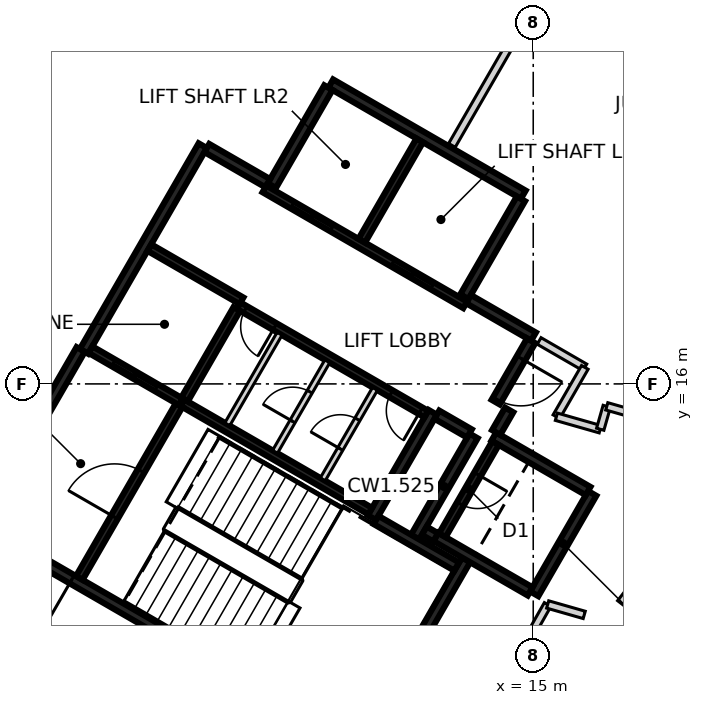
"""IFC4 building model, lengths in metres.
Left out: names, types, materials, properties, quantities, classifications, styles, units other than length and angle.
Written with IfcOpenShell. Run it as: python <this file> out.ifc"""

import sys

from ifc_helpers import new_model, si_unit, direction, frame, frame_2d, origin, place, context, subcontext, project, spatial, rectangle, extrude, element, fill, save


model = new_model("IFC4")
c1 = context("Model", 3, precision=1e-05, world=origin(), true_north=direction((0.0, 1.0)))
c2 = subcontext(c1, "Body", "Model", "MODEL_VIEW")
j1 = project(units=[si_unit("LENGTHUNIT", "METRE"), si_unit("PLANEANGLEUNIT", "RADIAN")], contexts=[c1])
p1 = place(None, origin())
s1 = spatial("IfcSite", under=j1, at=p1, CompositionType="ELEMENT")
p2 = place(p1, origin())
s2 = spatial("IfcBuilding", under=s1, at=p2, CompositionType="ELEMENT")
p3 = place(p2, frame((0.0, 0.0, 49.4)))
s3 = spatial("IfcBuildingStorey", under=s2, at=p3, CompositionType="ELEMENT", Elevation=49.4)
p4 = place(p3, frame((10.42, 6.498, 0.0), z_axis=(0.0, 0.0, 1.0), x_axis=(-0.866021906294, 0.500006057782, 0.0)))
e1 = element("IfcWall", 1, at=p4, inside=s3, PredefinedType="SHEAR", context=c2, shape_type="SweptSolid", body=[
    extrude(rectangle(XDim=11.55, YDim=0.25, at=frame_2d((5.775, 0.0))), origin(), (0.0, 0.0, 1.0), 3.125),
])
p5 = place(p4, frame((10.025, 0.0, 0.0)))
e2 = element("IfcOpeningElement", 2, at=p5, cuts=e1, PredefinedType="OPENING", context=c2, shape_type="SweptSolid", body=[
    extrude(rectangle(XDim=1.2, YDim=2.1, at=frame_2d((0.6, 1.05))), frame((0.0, 0.135, 0.0), z_axis=(0.0, -1.0, 0.0), x_axis=(1.0, 0.0, 0.0)), (0.0, 0.0, 1.0), 0.27),
])
p6 = place(p4, frame((8.725, 0.0, 0.0)))
e3 = element("IfcOpeningElement", 3, at=p6, cuts=e1, PredefinedType="OPENING", context=c2, shape_type="SweptSolid", body=[
    extrude(rectangle(XDim=1.2, YDim=2.1, at=frame_2d((0.6, 1.05))), frame((0.0, 0.135, 0.0), z_axis=(0.0, -1.0, 0.0), x_axis=(1.0, 0.0, 0.0)), (0.0, 0.0, 1.0), 0.27),
])
p7 = place(p3, frame((3.179, 16.856, 0.0), z_axis=(0.0, 0.0, 1.0), x_axis=(0.500004234368, 0.866022959057, 0.0)))
e4 = element("IfcWall", 4, at=p7, inside=s3, PredefinedType="SHEAR", context=c2, shape_type="SweptSolid", body=[
    extrude(rectangle(XDim=6.25, YDim=0.25, at=frame_2d((3.125, 0.0))), origin(), (0.0, 0.0, 1.0), 3.125),
])
p8 = place(p3, frame((9.673, 23.903, 0.0), z_axis=(0.0, 0.0, 1.0), x_axis=(0.86603616409, -0.499981362141, 0.0)))
e5 = element("IfcWall", 5, at=p8, inside=s3, PredefinedType="SHEAR", context=c2, shape_type="SweptSolid", body=[
    extrude(rectangle(XDim=5.85, YDim=0.25, at=frame_2d((2.925, 0.0))), origin(), (0.0, 0.0, 1.0), 3.125),
])
p9 = place(p3, frame((0.48, 12.381, 0.0), z_axis=(0.0, 0.0, 1.0), x_axis=(0.49999885962, 0.866026062182, 0.0)))
e6 = element("IfcWall", 6, at=p9, inside=s3, PredefinedType="SHEAR", context=c2, shape_type="SweptSolid", body=[
    extrude(rectangle(XDim=5.225, YDim=0.25, at=frame_2d((2.612, 0.0))), origin(), (0.0, 0.0, 1.0), 3.125),
])
p10 = place(p3, frame((13.238, 11.378, 0.0), z_axis=(0.0, 0.0, 1.0), x_axis=(-0.500008851346, -0.866020293397, 0.0)))
e7 = element("IfcWall", 7, at=p10, inside=s3, PredefinedType="SHEAR", context=c2, shape_type="SweptSolid", body=[
    extrude(rectangle(XDim=5.51, YDim=0.25, at=frame_2d((2.755, 0.0))), origin(), (0.0, 0.0, 1.0), 3.125),
])
p11 = place(p3, frame((12.357, 15.252, 0.0), z_axis=(0.0, 0.0, 1.0), x_axis=(-0.500028443584, -0.866008981251, 0.0)))
e8 = element("IfcWall", 8, at=p11, inside=s3, PredefinedType="SHEAR", context=c2, shape_type="SweptSolid", body=[
    extrude(rectangle(XDim=3.2, YDim=0.25, at=frame_2d((1.6, 0.0))), origin(), (0.0, 0.0, 1.0), 3.125),
])
for number, where, z_axis, x_axis in (
    (9, (8.123, 21.219, 0.0), (0.0, 0.0, 1.0), (0.5, 0.866, 0.0)),
    (10, (14.676, 20.87, 0.0), (0.0, 0.0, 1.0), (-0.5, -0.866, 0.0)),
):
    element("IfcWall", number, at=place(p3, frame(where, z_axis=z_axis, x_axis=x_axis)), inside=s3, PredefinedType="SHEAR", context=c2, shape_type="SweptSolid", body=[
        extrude(rectangle(XDim=2.975, YDim=0.25, at=frame_2d((1.487, 0.0))), origin(), (0.0, 0.0, 1.0), 3.125),
    ])
p12 = place(p3, frame((16.552, 13.119, 0.0), z_axis=(0.0, 0.0, 1.0), x_axis=(-0.499978833458, -0.866037623948, 0.0)))
e11 = element("IfcWall", 11, at=p12, inside=s3, PredefinedType="SHEAR", context=c2, shape_type="SweptSolid", body=[
    extrude(rectangle(XDim=3.05, YDim=0.25, at=frame_2d((1.525, 0.0))), origin(), (0.0, 0.0, 1.0), 3.125),
])
p13 = place(p3, frame((14.918, 10.54, 0.0), z_axis=(0.0, 0.0, 1.0), x_axis=(-0.866063538972, 0.499933942099, 0.0)))
e12 = element("IfcWall", 12, at=p13, inside=s3, PredefinedType="SHEAR", context=c2, shape_type="SweptSolid", body=[
    extrude(rectangle(XDim=2.865, YDim=0.25, at=frame_2d((1.432, 0.0))), origin(), (0.0, 0.0, 1.0), 3.125),
])
p14 = place(p3, frame((13.963, 14.614, 0.0), z_axis=(0.0, 0.0, 1.0), x_axis=(0.866042235819, -0.499970844928, 0.0)))
e13 = element("IfcWall", 13, at=p14, inside=s3, PredefinedType="SHEAR", context=c2, shape_type="SweptSolid", body=[
    extrude(rectangle(XDim=2.865, YDim=0.25, at=frame_2d((1.432, 0.0))), origin(), (0.0, 0.0, 1.0), 3.125),
])
p15 = place(p3, frame((11.888, 11.961, 0.0), z_axis=(0.0, 0.0, 1.0), x_axis=(0.500003324108, 0.866023484601, 0.0)))
e14 = element("IfcWall", 14, at=p15, inside=s3, PredefinedType="SHEAR", context=c2, shape_type="SweptSolid", body=[
    extrude(rectangle(XDim=3.085, YDim=0.25, at=frame_2d((1.542, 0.0))), origin(), (0.0, 0.0, 1.0), 3.125),
])
p16 = place(p3, frame((10.865, 12.418, 0.0), z_axis=(0.0, 0.0, 1.0), x_axis=(0.866026229868, -0.499998569178, 0.0)))
e15 = element("IfcWall", 15, at=p16, inside=s3, PredefinedType="SHEAR", context=c2, shape_type="SweptSolid", body=[
    extrude(rectangle(XDim=2.449, YDim=0.25, at=frame_2d((1.225, 0.0))), origin(), (0.0, 0.0, 1.0), 3.125),
])
p17 = place(p3, frame((13.297, 18.231, 0.0), z_axis=(0.0, 0.0, 1.0), x_axis=(0.866043531843, -0.499968599967, 0.0)))
e16 = element("IfcWall", 16, at=p17, inside=s3, PredefinedType="SHEAR", context=c2, shape_type="SweptSolid", body=[
    extrude(rectangle(XDim=1.975, YDim=0.25, at=frame_2d((0.987, 0.0))), origin(), (0.0, 0.0, 1.0), 3.125),
])
p18 = place(p3, frame((6.413, 22.206, 0.0), z_axis=(0.0, 0.0, 1.0), x_axis=(0.866016279763, -0.500015802937, 0.0)))
e17 = element("IfcWall", 17, at=p18, inside=s3, PredefinedType="SHEAR", context=c2, shape_type="SweptSolid", body=[
    extrude(rectangle(XDim=1.849, YDim=0.25, at=frame_2d((0.925, 0.0))), origin(), (0.0, 0.0, 1.0), 3.125),
])
p19 = place(p3, frame((14.945, 17.135, 0.0), z_axis=(0.0, 0.0, 1.0), x_axis=(-0.499983108224, -0.866035156036, 0.0)))
e18 = element("IfcWall", 18, at=p19, inside=s3, PredefinedType="SHEAR", context=c2, shape_type="SweptSolid", body=[
    extrude(rectangle(XDim=1.865, YDim=0.25, at=frame_2d((0.932, 0.0))), origin(), (0.0, 0.0, 1.0), 3.125),
])
p20 = place(p19, frame((0.535, 0.0, 0.0)))
e19 = element("IfcOpeningElement", 19, at=p20, cuts=e18, PredefinedType="OPENING", context=c2, shape_type="SweptSolid", body=[
    extrude(rectangle(XDim=1.25, YDim=2.1, at=frame_2d((0.625, 1.05))), frame((0.0, 0.135, 0.0), z_axis=(0.0, -1.0, 0.0), x_axis=(1.0, 0.0, 0.0)), (0.0, 0.0, 1.0), 0.27),
])
p21 = place(p3, frame((13.322, 14.695, 0.0), z_axis=(0.0, 0.0, 1.0), x_axis=(-0.866017078145, 0.500014420154, 0.0)))
e20 = element("IfcWall", 20, at=p21, inside=s3, PredefinedType="SHEAR", context=c2, shape_type="SweptSolid", body=[
    extrude(rectangle(XDim=0.989, YDim=0.25, at=frame_2d((0.495, 0.0))), origin(), (0.0, 0.0, 1.0), 3.125),
])
p22 = place(p3, frame((14.368, 15.315, 0.0), z_axis=(0.0, 0.0, 1.0), x_axis=(-0.499897359611, -0.866084655132, 0.0)))
e21 = element("IfcWall", 21, at=p22, inside=s3, PredefinedType="SHEAR", context=c2, shape_type="SweptSolid", body=[
    extrude(rectangle(XDim=0.685, YDim=0.25, at=frame_2d((0.342, 0.0))), origin(), (0.0, 0.0, 1.0), 3.125),
])
p23 = place(p3, frame((12.433, 11.964, 0.0), z_axis=(0.0, 0.0, 1.0), x_axis=(-0.866055875208, 0.499947218231, 0.0)))
e22 = element("IfcWall", 22, at=p23, inside=s3, PredefinedType="SHEAR", context=c2, shape_type="SweptSolid", body=[
    extrude(rectangle(XDim=0.345, YDim=0.25, at=frame_2d((0.172, 0.0))), origin(), (0.0, 0.0, 1.0), 3.125),
])
p24 = place(p3, frame((13.21, 18.08, 0.0), z_axis=(0.0, 0.0, 1.0), x_axis=(-0.866030299012, 0.499991521122, 0.0)))
e23 = element("IfcWall", 23, at=p24, inside=s3, PredefinedType="SHEAR", context=c2, shape_type="SweptSolid", body=[
    extrude(rectangle(XDim=6.1, YDim=0.2, at=frame_2d((3.05, 0.0))), origin(), (0.0, 0.0, 1.0), 3.125),
])
p25 = place(p24, frame((1.0, 0.0, 0.0)))
e24 = element("IfcOpeningElement", 24, at=p25, cuts=e23, PredefinedType="OPENING", context=c2, shape_type="SweptSolid", body=[
    extrude(rectangle(XDim=1.2, YDim=2.1, at=frame_2d((0.6, 1.05))), frame((0.0, 0.11, 0.0), z_axis=(0.0, -1.0, 0.0), x_axis=(1.0, 0.0, 0.0)), (0.0, 0.0, 1.0), 0.22),
])
p26 = place(p24, frame((4.05, 0.0, 0.0)))
e25 = element("IfcOpeningElement", 25, at=p26, cuts=e23, PredefinedType="OPENING", context=c2, shape_type="SweptSolid", body=[
    extrude(rectangle(XDim=1.2, YDim=2.1, at=frame_2d((0.6, 1.05))), frame((0.0, 0.11, 0.0), z_axis=(0.0, -1.0, 0.0), x_axis=(1.0, 0.0, 0.0)), (0.0, 0.0, 1.0), 0.22),
])
p27 = place(p3, frame((5.775, 15.502, 0.0), z_axis=(0.0, 0.0, 1.0), x_axis=(0.866020080793, -0.500009219579, 0.0)))
e26 = element("IfcWall", 26, at=p27, inside=s3, PredefinedType="SHEAR", context=c2, shape_type="SweptSolid", body=[
    extrude(rectangle(XDim=5.699, YDim=0.2, at=frame_2d((2.85, 0.0))), origin(), (0.0, 0.0, 1.0), 3.125),
])
p28 = place(p3, frame((12.185, 15.207, 0.0), z_axis=(0.0, 0.0, 1.0), x_axis=(-0.866020080793, 0.500009219579, 0.0)))
e27 = element("IfcWall", 27, at=p28, inside=s3, PredefinedType="SHEAR", context=c2, shape_type="SweptSolid", body=[
    extrude(rectangle(XDim=5.699, YDim=0.2, at=frame_2d((2.85, 0.0))), origin(), (0.0, 0.0, 1.0), 3.125),
])
p29 = place(p28, frame((0.174, 0.0, 0.0)))
e28 = element("IfcOpeningElement", 28, at=p29, cuts=e27, PredefinedType="OPENING", context=c2, shape_type="SweptSolid", body=[
    extrude(rectangle(XDim=0.9, YDim=2.1, at=frame_2d((0.45, 1.05))), frame((0.0, 0.11, 0.0), z_axis=(0.0, -1.0, 0.0), x_axis=(1.0, 0.0, 0.0)), (0.0, 0.0, 1.0), 0.22),
])
p30 = place(p28, frame((4.599, 0.0, 0.0)))
e29 = element("IfcOpeningElement", 29, at=p30, cuts=e27, PredefinedType="OPENING", context=c2, shape_type="SweptSolid", body=[
    extrude(rectangle(XDim=0.9, YDim=2.1, at=frame_2d((0.45, 1.05))), frame((0.0, 0.11, 0.0), z_axis=(0.0, -1.0, 0.0), x_axis=(1.0, 0.0, 0.0)), (0.0, 0.0, 1.0), 0.22),
])
p31 = place(p3, frame((3.057, 10.895, 0.0), z_axis=(0.0, 0.0, 1.0), x_axis=(0.499989418164, 0.866031513124, 0.0)))
e30 = element("IfcWall", 30, at=p31, inside=s3, PredefinedType="SHEAR", context=c2, shape_type="SweptSolid", body=[
    extrude(rectangle(XDim=5.251, YDim=0.2, at=frame_2d((2.625, 0.0))), origin(), (0.0, 0.0, 1.0), 3.125),
])
p32 = place(p31, frame((1.849, 0.0, 0.0)))
e31 = element("IfcOpeningElement", 31, at=p32, cuts=e30, PredefinedType="OPENING", context=c2, shape_type="SweptSolid", body=[
    extrude(rectangle(XDim=1.4, YDim=2.1, at=frame_2d((0.7, 1.05))), frame((0.0, 0.11, 0.0), z_axis=(0.0, -1.0, 0.0), x_axis=(1.0, 0.0, 0.0)), (0.0, 0.0, 1.0), 0.22),
])
p33 = place(p3, frame((10.489, 19.767, 0.0), z_axis=(0.0, 0.0, 1.0), x_axis=(0.499946628782, 0.866056215479, 0.0)))
e32 = element("IfcWall", 32, at=p33, inside=s3, PredefinedType="SHEAR", context=c2, shape_type="SweptSolid", body=[
    extrude(rectangle(XDim=3.048, YDim=0.2, at=frame_2d((1.524, 0.0))), origin(), (0.0, 0.0, 1.0), 3.125),
])
p34 = place(p3, frame((14.008, 14.442, 0.0), z_axis=(0.0, 0.0, 1.0), x_axis=(-0.499986818241, -0.866033014143, 0.0)))
e33 = element("IfcWall", 33, at=p34, inside=s3, PredefinedType="SHEAR", context=c2, shape_type="SweptSolid", body=[
    extrude(rectangle(XDim=2.798, YDim=0.2, at=frame_2d((1.399, 0.0))), origin(), (0.0, 0.0, 1.0), 3.125),
])
p35 = place(p34, frame((0.949, 0.0, 0.0)))
e34 = element("IfcOpeningElement", 34, at=p35, cuts=e33, PredefinedType="OPENING", context=c2, shape_type="SweptSolid", body=[
    extrude(rectangle(XDim=0.9, YDim=2.1, at=frame_2d((0.45, 1.05))), frame((0.0, 0.11, 0.0), z_axis=(0.0, -1.0, 0.0), x_axis=(1.0, 0.0, 0.0)), (0.0, 0.0, 1.0), 0.22),
])
p36 = place(p3, frame((7.199, 17.97, 0.0), z_axis=(0.0, 0.0, 1.0), x_axis=(-0.499968400327, -0.866043647095, 0.0)))
e35 = element("IfcWall", 35, at=p36, inside=s3, PredefinedType="SHEAR", context=c2, shape_type="SweptSolid", body=[
    extrude(rectangle(XDim=2.75, YDim=0.2, at=frame_2d((1.375, 0.0))), origin(), (0.0, 0.0, 1.0), 3.125),
])
p37 = place(p3, frame((5.725, 15.531, 0.0), z_axis=(0.0, 0.0, 1.0), x_axis=(-0.866037306777, 0.499979382845, 0.0)))
e36 = element("IfcWall", 36, at=p37, inside=s3, PredefinedType="SHEAR", context=c2, shape_type="SweptSolid", body=[
    extrude(rectangle(XDim=2.742, YDim=0.2, at=frame_2d((1.371, 0.0))), origin(), (0.0, 0.0, 1.0), 3.125),
])
p38 = place(p37, frame((0.743, 0.0, 0.0)))
e37 = element("IfcOpeningElement", 37, at=p38, cuts=e36, PredefinedType="OPENING", context=c2, shape_type="SweptSolid", body=[
    extrude(rectangle(XDim=1.3, YDim=2.1, at=frame_2d((0.65, 1.05))), frame((0.0, 0.11, 0.0), z_axis=(0.0, -1.0, 0.0), x_axis=(1.0, 0.0, 0.0)), (0.0, 0.0, 1.0), 0.22),
])
p39 = place(p3, frame((4.901, 19.586, 0.0), z_axis=(0.0, 0.0, 1.0), x_axis=(0.866022890907, -0.500004352405, 0.0)))
e38 = element("IfcWall", 38, at=p39, inside=s3, PredefinedType="SHEAR", context=c2, shape_type="SweptSolid", body=[
    extrude(rectangle(XDim=2.799, YDim=0.2, at=frame_2d((1.399, 0.0))), origin(), (0.0, 0.0, 1.0), 3.125),
])
p40 = place(p3, frame((9.462, 13.489, 0.0), z_axis=(0.0, 0.0, 1.0), x_axis=(0.50002746344, 0.86600954718, 0.0)))
e39 = element("IfcWall", 39, at=p40, inside=s3, PredefinedType="PARTITIONING", context=c2, shape_type="SweptSolid", body=[
    extrude(rectangle(XDim=2.748, YDim=0.15, at=frame_2d((1.374, 0.0))), origin(), (0.0, 0.0, 1.0), 3.125),
])
p41 = place(p40, frame((0.924, 0.0, 0.0)))
e40 = element("IfcOpeningElement", 40, at=p41, cuts=e39, PredefinedType="OPENING", context=c2, shape_type="SweptSolid", body=[
    extrude(rectangle(XDim=0.9, YDim=2.1, at=frame_2d((0.45, 1.05))), frame((0.0, 0.085, 0.0), z_axis=(0.0, -1.0, 0.0), x_axis=(1.0, 0.0, 0.0)), (0.0, 0.0, 1.0), 0.17),
])
p42 = place(p3, frame((8.207, 14.214, 0.0), z_axis=(0.0, 0.0, 1.0), x_axis=(0.499922376475, 0.866070215109, 0.0)))
e41 = element("IfcWall", 41, at=p42, inside=s3, PredefinedType="PARTITIONING", context=c2, shape_type="SweptSolid", body=[
    extrude(rectangle(XDim=2.749, YDim=0.15, at=frame_2d((1.374, 0.0))), origin(), (0.0, 0.0, 1.0), 3.125),
])
p43 = place(p42, frame((0.924, 0.0, 0.0)))
e42 = element("IfcOpeningElement", 42, at=p43, cuts=e41, PredefinedType="OPENING", context=c2, shape_type="SweptSolid", body=[
    extrude(rectangle(XDim=0.9, YDim=2.1, at=frame_2d((0.45, 1.05))), frame((0.0, 0.085, 0.0), z_axis=(0.0, -1.0, 0.0), x_axis=(1.0, 0.0, 0.0)), (0.0, 0.0, 1.0), 0.17),
])
p44 = place(p3, frame((6.951, 14.939, 0.0), z_axis=(0.0, 0.0, 1.0), x_axis=(0.50002746344, 0.86600954718, 0.0)))
e43 = element("IfcWall", 43, at=p44, inside=s3, PredefinedType="PARTITIONING", context=c2, shape_type="SweptSolid", body=[
    extrude(rectangle(XDim=2.748, YDim=0.15, at=frame_2d((1.374, 0.0))), origin(), (0.0, 0.0, 1.0), 3.125),
])
p45 = place(p3, frame((12.432, 4.992, 0.0), z_axis=(0.0, 0.0, 1.0), x_axis=(0.492790102015, 0.870148214591, 0.0)))
e44 = element("IfcWall", 44, at=p45, inside=s3, PredefinedType="PARTITIONING", context=c2, shape_type="SweptSolid", body=[
    extrude(rectangle(XDim=5.981, YDim=0.2, at=frame_2d((2.991, 0.0))), origin(), (0.0, 0.0, 1.0), 3.125),
])
p46 = place(p3, frame((15.156, 17.13, 0.0), z_axis=(0.0, 0.0, 1.0), x_axis=(0.865755062894, -0.500467952093, 0.0)))
e45 = element("IfcWall", 45, at=p46, inside=s3, PredefinedType="PARTITIONING", context=c2, shape_type="SweptSolid", body=[
    extrude(rectangle(XDim=1.389, YDim=0.2, at=frame_2d((0.694, 0.0))), origin(), (0.0, 0.0, 1.0), 3.125),
])
p47 = place(p3, frame((15.38, 10.197, 0.0), z_axis=(0.0, 0.0, 1.0), x_axis=(0.961523947641, -0.274721127897, 0.0)))
e46 = element("IfcWall", 46, at=p47, inside=s3, PredefinedType="PARTITIONING", context=c2, shape_type="SweptSolid", body=[
    extrude(rectangle(XDim=1.001, YDim=0.2, at=frame_2d((0.5, 0.0))), origin(), (0.0, 0.0, 1.0), 3.125),
])
p48 = place(p3, frame((15.609, 15.136, 0.0), z_axis=(0.0, 0.0, 1.0), x_axis=(0.499501622561, 0.866312950993, 0.0)))
e47 = element("IfcWall", 47, at=p48, inside=s3, PredefinedType="PARTITIONING", context=c2, shape_type="SweptSolid", body=[
    extrude(rectangle(XDim=1.5, YDim=0.2, at=frame_2d((0.75, 0.0))), origin(), (0.0, 0.0, 1.0), 3.125),
])
p49 = place(p3, frame((15.609, 15.136, 0.0), z_axis=(0.0, 0.0, 1.0), x_axis=(0.961662011825, -0.274237442763, 0.0)))
e48 = element("IfcWall", 48, at=p49, inside=s3, PredefinedType="PARTITIONING", context=c2, shape_type="SweptSolid", body=[
    extrude(rectangle(XDim=1.2, YDim=0.2, at=frame_2d((0.6, 0.0))), origin(), (0.0, 0.0, 1.0), 3.125),
])
p50 = place(p3, frame((16.763, 14.807, 0.0), z_axis=(0.0, 0.0, 1.0), x_axis=(0.274464026122, 0.961597368115, 0.0)))
e49 = element("IfcWall", 49, at=p50, inside=s3, PredefinedType="PARTITIONING", context=c2, shape_type="SweptSolid", body=[
    extrude(rectangle(XDim=0.627, YDim=0.2, at=frame_2d((0.313, 0.0))), origin(), (0.0, 0.0, 1.0), 3.125),
])
p51 = place(p3, frame((16.935, 15.41, 0.0), z_axis=(0.0, 0.0, 1.0), x_axis=(0.961602664273, -0.274445470107, 0.0)))
e50 = element("IfcWall", 50, at=p51, inside=s3, PredefinedType="PARTITIONING", context=c2, shape_type="SweptSolid", body=[
    extrude(rectangle(XDim=0.936, YDim=0.2, at=frame_2d((0.468, 0.0))), origin(), (0.0, 0.0, 1.0), 3.125),
])
p52 = place(p3, frame((17.299, 10.235, 0.0), z_axis=(0.0, 0.0, 1.0), x_axis=(0.61377461522, 0.789481299153, 0.0)))
e51 = element("IfcWall", 51, at=p52, inside=s3, PredefinedType="PARTITIONING", context=c2, shape_type="SweptSolid", body=[
    extrude(rectangle(XDim=2.851, YDim=0.2, at=frame_2d((1.426, 0.0))), origin(), (0.0, 0.0, 1.0), 3.125),
])
p53 = place(p3, frame((12.861, 22.276, 0.0), z_axis=(0.0, 0.0, 1.0), x_axis=(0.499824227645, 0.86612686222, 0.0)))
e52 = element("IfcWall", 52, at=p53, inside=s3, PredefinedType="PARTITIONING", context=c2, shape_type="SweptSolid", body=[
    extrude(rectangle(XDim=7.753, YDim=0.2, at=frame_2d((3.876, 0.0))), origin(), (0.0, 0.0, 1.0), 3.125),
])
p54 = place(p38, origin())
e53 = element("IfcDoor", 53, at=p54, inside=s3, OperationType="SLIDING_TO_RIGHT", PredefinedType="DOOR", context=c2, shape_type="SweptSolid", body=[
    extrude(rectangle(XDim=1.3, YDim=2.1, at=frame_2d((0.65, 1.05))), frame((0.0, 0.025, 0.0), z_axis=(0.0, -1.0, 0.0), x_axis=(1.0, 0.0, 0.0)), (0.0, 0.0, 1.0), 0.05),
])
fill(e37, e53)
p55 = place(p25, origin())
e54 = element("IfcDoor", 54, at=p55, inside=s3, OperationType="DOUBLE_DOOR_SLIDING", PredefinedType="DOOR", context=c2, shape_type="SweptSolid", body=[
    extrude(rectangle(XDim=1.2, YDim=2.1, at=frame_2d((0.6, 1.05))), frame((0.0, 0.025, 0.0), z_axis=(0.0, -1.0, 0.0), x_axis=(1.0, 0.0, 0.0)), (0.0, 0.0, 1.0), 0.05),
])
fill(e24, e54)
p56 = place(p26, origin())
e55 = element("IfcDoor", 55, at=p56, inside=s3, OperationType="DOUBLE_DOOR_SLIDING", PredefinedType="DOOR", context=c2, shape_type="SweptSolid", body=[
    extrude(rectangle(XDim=1.2, YDim=2.1, at=frame_2d((0.6, 1.05))), frame((0.0, 0.025, 0.0), z_axis=(0.0, -1.0, 0.0), x_axis=(1.0, 0.0, 0.0)), (0.0, 0.0, 1.0), 0.05),
])
fill(e25, e55)
p57 = place(p20, origin())
e56 = element("IfcDoor", 56, at=p57, inside=s3, OperationType="SINGLE_SWING_LEFT", PredefinedType="DOOR", context=c2, shape_type="SweptSolid", body=[
    extrude(rectangle(XDim=1.25, YDim=2.1, at=frame_2d((0.625, 1.05))), frame((0.0, 0.025, 0.0), z_axis=(0.0, -1.0, 0.0), x_axis=(1.0, 0.0, 0.0)), (0.0, 0.0, 1.0), 0.05),
])
fill(e19, e56)
p58 = place(p6, origin())
e57 = element("IfcDoor", 57, at=p58, inside=s3, OperationType="SINGLE_SWING_RIGHT", PredefinedType="DOOR", context=c2, shape_type="SweptSolid", body=[
    extrude(rectangle(XDim=1.2, YDim=2.1, at=frame_2d((0.6, 1.05))), frame((0.0, 0.025, 0.0), z_axis=(0.0, -1.0, 0.0), x_axis=(1.0, 0.0, 0.0)), (0.0, 0.0, 1.0), 0.05),
])
fill(e3, e57)
p59 = place(p32, origin())
e58 = element("IfcDoor", 58, at=p59, inside=s3, OperationType="SINGLE_SWING_RIGHT", PredefinedType="DOOR", context=c2, shape_type="SweptSolid", body=[
    extrude(rectangle(XDim=1.4, YDim=2.1, at=frame_2d((0.7, 1.05))), frame((0.0, 0.025, 0.0), z_axis=(0.0, -1.0, 0.0), x_axis=(1.0, 0.0, 0.0)), (0.0, 0.0, 1.0), 0.05),
])
fill(e31, e58)
p60 = place(p29, origin())
e59 = element("IfcDoor", 59, at=p60, inside=s3, OperationType="SINGLE_SWING_LEFT", PredefinedType="DOOR", context=c2, shape_type="SweptSolid", body=[
    extrude(rectangle(XDim=0.9, YDim=2.1, at=frame_2d((0.45, 1.05))), frame((0.0, 0.025, 0.0), z_axis=(0.0, -1.0, 0.0), x_axis=(1.0, 0.0, 0.0)), (0.0, 0.0, 1.0), 0.05),
])
fill(e28, e59)
p61 = place(p41, origin())
e60 = element("IfcDoor", 60, at=p61, inside=s3, OperationType="SINGLE_SWING_RIGHT", PredefinedType="DOOR", context=c2, shape_type="SweptSolid", body=[
    extrude(rectangle(XDim=0.9, YDim=2.1, at=frame_2d((0.45, 1.05))), frame((0.0, 0.025, 0.0), z_axis=(0.0, -1.0, 0.0), x_axis=(1.0, 0.0, 0.0)), (0.0, 0.0, 1.0), 0.05),
])
fill(e40, e60)
p62 = place(p43, origin())
e61 = element("IfcDoor", 61, at=p62, inside=s3, OperationType="SINGLE_SWING_LEFT", PredefinedType="DOOR", context=c2, shape_type="SweptSolid", body=[
    extrude(rectangle(XDim=0.9, YDim=2.1, at=frame_2d((0.45, 1.05))), frame((0.0, 0.025, 0.0), z_axis=(0.0, -1.0, 0.0), x_axis=(1.0, 0.0, 0.0)), (0.0, 0.0, 1.0), 0.05),
])
fill(e42, e61)
p63 = place(p30, origin())
e62 = element("IfcDoor", 62, at=p63, inside=s3, OperationType="SINGLE_SWING_RIGHT", PredefinedType="DOOR", context=c2, shape_type="SweptSolid", body=[
    extrude(rectangle(XDim=0.9, YDim=2.1, at=frame_2d((0.45, 1.05))), frame((0.0, 0.025, 0.0), z_axis=(0.0, -1.0, 0.0), x_axis=(1.0, 0.0, 0.0)), (0.0, 0.0, 1.0), 0.05),
])
fill(e29, e62)
p64 = place(p35, origin())
e63 = element("IfcDoor", 63, at=p64, inside=s3, OperationType="SINGLE_SWING_LEFT", PredefinedType="DOOR", context=c2, shape_type="SweptSolid", body=[
    extrude(rectangle(XDim=0.9, YDim=2.1, at=frame_2d((0.45, 1.05))), frame((0.0, 0.025, 0.0), z_axis=(0.0, -1.0, 0.0), x_axis=(1.0, 0.0, 0.0)), (0.0, 0.0, 1.0), 0.05),
])
fill(e34, e63)
save(model, sys.argv[1])
